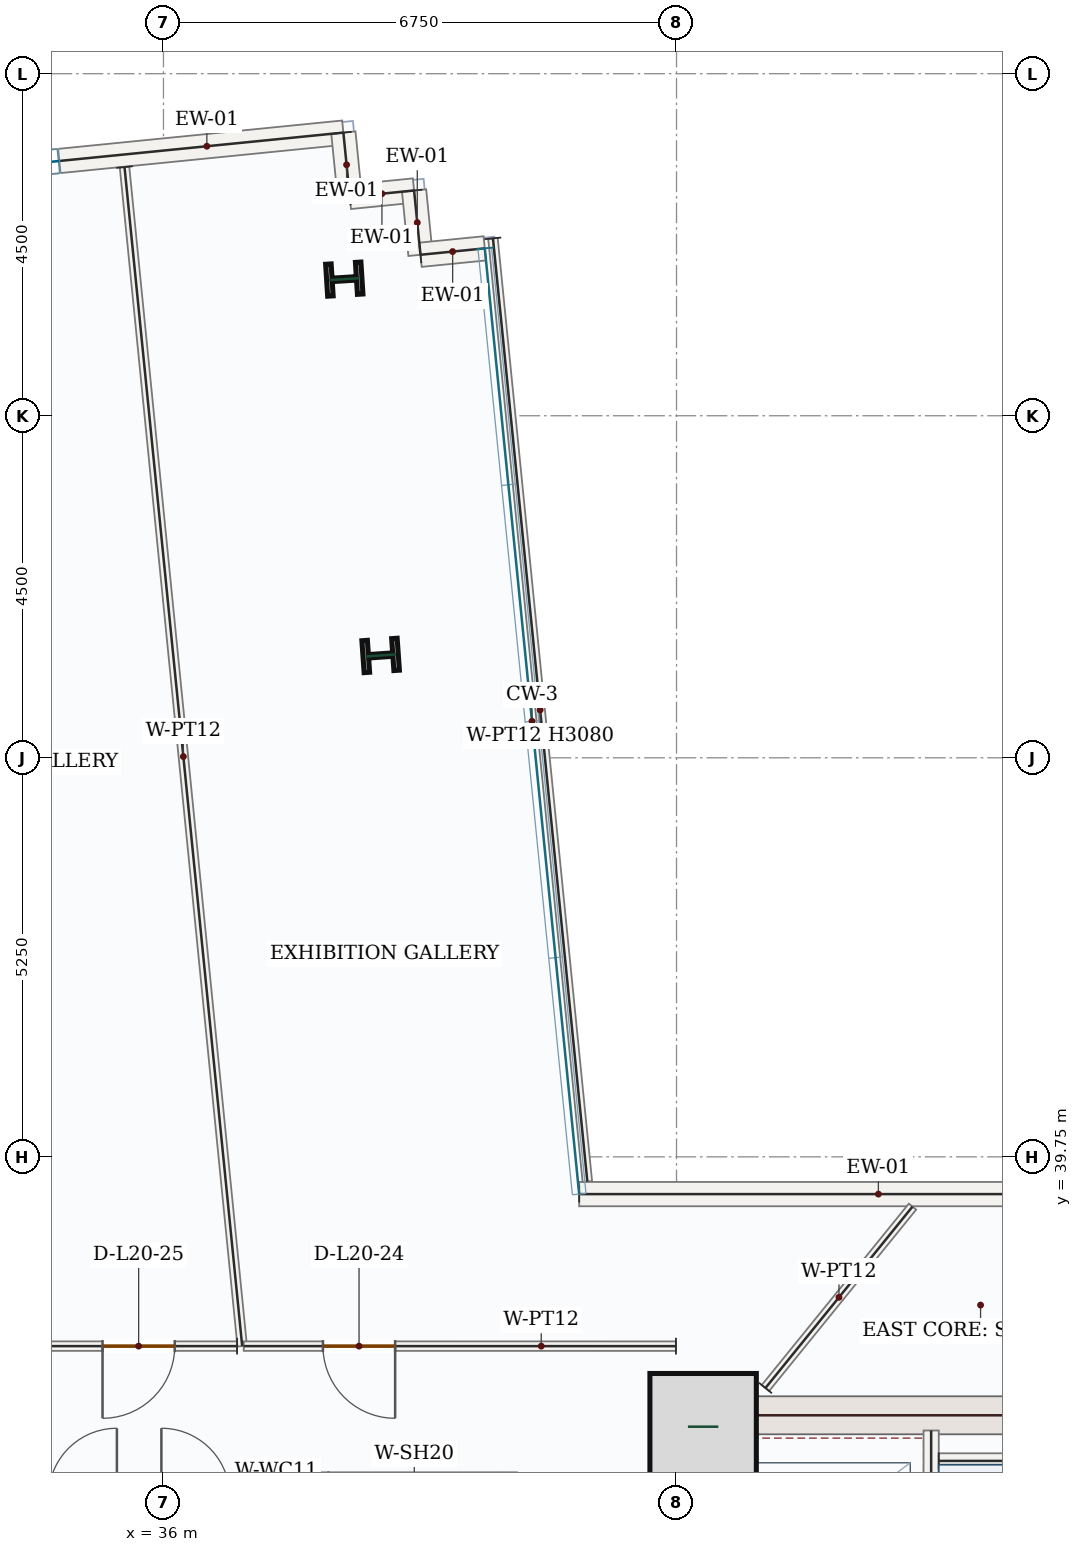
"""IFC4 building model, lengths in metres.
Left out: names, types, materials, properties, quantities, classifications, styles, units other than length and angle.
Written with IfcOpenShell. Run it as: python <this file> out.ifc"""

import sys

from ifc_helpers import new_model, si_unit, direction, frame, frame_2d, origin, origin_2d, place, context, subcontext, project, spatial, rectangle, i_section, extrude, source, transform, mapped, element, fill, save


model = new_model("IFC4")
c1 = context("Model", 3, precision=1e-05, world=origin(), true_north=direction((0.0, 1.0)))
c2 = subcontext(c1, "Body", "Model", "MODEL_VIEW")
j1 = project(units=[si_unit("LENGTHUNIT", "METRE"), si_unit("PLANEANGLEUNIT", "RADIAN")], contexts=[c1])
p1 = place(None, origin())
s1 = spatial("IfcSite", under=j1, at=p1, CompositionType="ELEMENT")
p2 = place(p1, origin())
s2 = spatial("IfcBuilding", under=s1, at=p2, CompositionType="ELEMENT")
p3 = place(p2, frame((0.0, 0.0, 92.1)))
s3 = spatial("IfcBuildingStorey", under=s2, at=p3, CompositionType="ELEMENT", Elevation=92.1)
p4 = place(p3, frame((43.0, 28.05, 0.0), z_axis=(0.0, 0.0, 1.0), x_axis=(0.0, 1.0, 0.0)))
e1 = element("IfcWall", 1, at=p4, inside=s3, PredefinedType="SHEAR", context=c2, shape_type="SweptSolid", body=[
    extrude(rectangle(XDim=8.55, YDim=0.5, at=frame_2d((4.275, 0.0))), origin(), (0.0, 0.0, 1.0), 3.95),
])
p5 = place(p4, frame((1.5, 0.0, 0.0)))
e2 = element("IfcOpeningElement", 2, at=p5, cuts=e1, PredefinedType="OPENING", context=c2, shape_type="SweptSolid", body=[
    extrude(rectangle(XDim=1.1, YDim=2.2, at=frame_2d((0.55, 1.1))), frame((0.0, 0.26, 0.0), z_axis=(0.0, -1.0, 0.0), x_axis=(1.0, 0.0, 0.0)), (0.0, 0.0, 1.0), 0.52),
])
m1 = source(origin(), c2, "Body", "SweptSolid", [
    extrude(rectangle(XDim=7.0, YDim=0.5, at=frame_2d((3.5, 0.0))), origin(), (0.0, 0.0, 1.0), 3.95),
])
p6 = place(p3, frame((43.25, 36.35, 0.0), z_axis=(0.0, 0.0, 1.0), x_axis=(1.0, 0.0, 0.0)))
e3 = element("IfcWall", 3, at=p6, inside=s3, PredefinedType="SHEAR", context=c2, shape_type="MappedRepresentation", body=[
    mapped(m1, transform((0.0, 0.0, 0.0), x_axis=(1.0, 0.0, 0.0), y_axis=(0.0, 1.0, 0.0), z_axis=(0.0, 0.0, 1.0), scale=1.0)),
])
m2 = source(origin(), c2, "Body", "SweptSolid", [
    extrude(rectangle(XDim=1.4, YDim=1.4, at=origin_2d()), origin(), (0.0, 0.0, 1.0), 4.2),
])
p7 = place(p3, frame((43.1, 36.2, 0.0), z_axis=(0.0, 0.0, 1.0), x_axis=(1.0, 0.0, 0.0)))
e4 = element("IfcColumn", 4, at=p7, inside=s3, PredefinedType="COLUMN", context=c2, shape_type="MappedRepresentation", body=[
    mapped(m2, transform((0.0, 0.0, 0.0), x_axis=(1.0, 0.0, 0.0), y_axis=(0.0, 1.0, 0.0), z_axis=(0.0, 0.0, 1.0), scale=1.0)),
])
m3 = source(origin(), c2, "Body", "SweptSolid", [
    extrude(i_section(OverallWidth=0.421, OverallDepth=0.465, WebThickness=0.045, FlangeThickness=0.073, FilletRadius=0.018, at=origin_2d()), origin(), (0.0, 0.0, 1.0), 4.2),
])
for number, where, z_axis, x_axis in (
    (5, (38.857, 46.346, 0.0), (0.0, 0.0, 1.0), (-0.07, 0.998, 0.0)),
    (6, (38.379, 51.297, 0.0), (0.0, 0.0, 1.0), (-0.063, 0.998, 0.0)),
):
    element("IfcColumn", number, at=place(p3, frame(where, z_axis=z_axis, x_axis=x_axis)), inside=s3, PredefinedType="COLUMN", context=c2, shape_type="MappedRepresentation", body=[
        mapped(m3, transform((0.0, 0.0, 0.0), x_axis=(1.0, 0.0, 0.0), y_axis=(0.0, 1.0, 0.0), z_axis=(0.0, 0.0, 1.0), scale=1.0)),
    ])
p8 = place(p3, frame((28.496, 52.24, 0.0), z_axis=(0.0, 0.0, 1.0), x_axis=(0.995054718915, 0.09932827576, 0.0)))
e7 = element("IfcWall", 7, at=p8, inside=s3, PredefinedType="SOLIDWALL", context=c2, shape_type="SweptSolid", body=[
    extrude(rectangle(XDim=9.92, YDim=0.32, at=frame_2d((4.96, 0.0))), origin(), (0.0, 0.0, 1.0), 3.95),
])
p9 = place(p8, frame((3.76, 0.0, 0.85)))
e8 = element("IfcOpeningElement", 8, at=p9, cuts=e7, PredefinedType="OPENING", context=c2, shape_type="SweptSolid", body=[
    extrude(rectangle(XDim=2.4, YDim=1.8, at=frame_2d((1.2, 0.9))), frame((0.0, 0.17, 0.0), z_axis=(0.0, -1.0, 0.0), x_axis=(1.0, 0.0, 0.0)), (0.0, 0.0, 1.0), 0.34),
])
m4 = source(origin(), c2, "Body", "SweptSolid", [
    extrude(rectangle(XDim=0.85, YDim=0.32, at=frame_2d((0.425, 0.0))), origin(), (0.0, 0.0, 1.0), 3.95),
])
for number, where, z_axis, x_axis in (
    (9, (38.367, 53.225, 0.0), (0.0, 0.0, 1.0), (0.099, -0.995, 0.0)),
    (10, (38.451, 52.379, 0.0), (0.0, 0.0, 1.0), (0.995, 0.099, 0.0)),
):
    element("IfcWall", number, at=place(p3, frame(where, z_axis=z_axis, x_axis=x_axis)), inside=s3, PredefinedType="SOLIDWALL", context=c2, shape_type="MappedRepresentation", body=[
        mapped(m4, transform((0.0, 0.0, 0.0), x_axis=(1.0, 0.0, 0.0), y_axis=(0.0, 1.0, 0.0), z_axis=(0.0, 0.0, 1.0), scale=1.0)),
    ])
m5 = source(origin(), c2, "Body", "SweptSolid", [
    extrude(rectangle(XDim=0.85, YDim=0.32, at=frame_2d((0.425, 0.0))), origin(), (0.0, 0.0, 1.0), 3.95),
])
p10 = place(p3, frame((39.297, 52.463, 0.0), z_axis=(0.0, 0.0, 1.0), x_axis=(0.099105525559, -0.995076929088, 0.0)))
e11 = element("IfcWall", 11, at=p10, inside=s3, PredefinedType="SOLIDWALL", context=c2, shape_type="MappedRepresentation", body=[
    mapped(m5, transform((0.0, 0.0, 0.0), x_axis=(1.0, 0.0, 0.0), y_axis=(0.0, 1.0, 0.0), z_axis=(0.0, 0.0, 1.0), scale=1.0)),
])
p11 = place(p3, frame((39.382, 51.618, 0.0), z_axis=(0.0, 0.0, 1.0), x_axis=(0.995079749343, 0.09907720448, 0.0)))
e12 = element("IfcWall", 12, at=p11, inside=s3, PredefinedType="SOLIDWALL", context=c2, shape_type="MappedRepresentation", body=[
    mapped(m4, transform((0.0, 0.0, 0.0), x_axis=(1.0, 0.0, 0.0), y_axis=(0.0, 1.0, 0.0), z_axis=(0.0, 0.0, 1.0), scale=1.0)),
])
m6 = source(origin(), c2, "Body", "SweptSolid", [
    extrude(rectangle(XDim=7.873, YDim=0.32, at=frame_2d((3.936, 0.0))), origin(), (0.0, 0.0, 1.0), 3.95),
])
p12 = place(p3, frame((41.469, 39.26, 0.0), z_axis=(0.0, 0.0, 1.0), x_axis=(1.0, 0.0, 0.0)))
e13 = element("IfcWall", 13, at=p12, inside=s3, PredefinedType="SOLIDWALL", context=c2, shape_type="MappedRepresentation", body=[
    mapped(m6, transform((0.0, 0.0, 0.0), x_axis=(1.0, 0.0, 0.0), y_axis=(0.0, 1.0, 0.0), z_axis=(0.0, 0.0, 1.0), scale=1.0)),
])
p13 = place(p3, frame((46.1, 28.15, 0.0), z_axis=(0.0, 0.0, 1.0), x_axis=(0.0, 1.0, 0.0)))
e14 = element("IfcWall", 14, at=p13, inside=s3, PredefinedType="SOLIDWALL", context=c2, shape_type="SweptSolid", body=[
    extrude(rectangle(XDim=8.0, YDim=0.2, at=frame_2d((4.0, 0.0))), origin(), (0.0, 0.0, 1.0), 3.95),
])
p14 = place(p13, frame((0.4, 0.0, 0.0)))
e15 = element("IfcOpeningElement", 15, at=p14, cuts=e14, PredefinedType="OPENING", context=c2, shape_type="SweptSolid", body=[
    extrude(rectangle(XDim=1.05, YDim=2.15, at=frame_2d((0.525, 1.075))), frame((0.0, 0.11, 0.0), z_axis=(0.0, -1.0, 0.0), x_axis=(1.0, 0.0, 0.0)), (0.0, 0.0, 1.0), 0.22),
])
m7 = source(origin(), c2, "Body", "SweptSolid", [
    extrude(rectangle(XDim=3.25, YDim=0.2, at=frame_2d((1.625, 0.0))), origin(), (0.0, 0.0, 1.0), 3.95),
])
p15 = place(p3, frame((46.2, 35.75, 0.0), z_axis=(0.0, 0.0, 1.0), x_axis=(1.0, 0.0, 0.0)))
e16 = element("IfcWall", 16, at=p15, inside=s3, PredefinedType="SOLIDWALL", context=c2, shape_type="MappedRepresentation", body=[
    mapped(m7, transform((0.0, 0.0, 0.0), x_axis=(1.0, 0.0, 0.0), y_axis=(0.0, 1.0, 0.0), z_axis=(0.0, 0.0, 1.0), scale=1.0)),
])
m8 = source(origin(), c2, "Body", "SweptSolid", [
    extrude(rectangle(XDim=2.4, YDim=0.2, at=frame_2d((1.2, 0.0))), origin(), (0.0, 0.0, 1.0), 3.95),
])
for number, where, z_axis, x_axis in (
    (17, (38.05, 33.2, 0.0), (0.0, 0.0, 1.0), (0.0, 1.0, 0.0)),
    (18, (40.55, 33.2, 0.0), (0.0, 0.0, 1.0), (0.0, 1.0, 0.0)),
):
    element("IfcWall", number, at=place(p3, frame(where, z_axis=z_axis, x_axis=x_axis)), inside=s3, PredefinedType="SOLIDWALL", context=c2, shape_type="MappedRepresentation", body=[
        mapped(m8, transform((0.0, 0.0, 0.0), x_axis=(1.0, 0.0, 0.0), y_axis=(0.0, 1.0, 0.0), z_axis=(0.0, 0.0, 1.0), scale=1.0)),
    ])
m9 = source(origin(), c2, "Body", "SweptSolid", [
    extrude(rectangle(XDim=3.072, YDim=0.125, at=frame_2d((1.536, 0.0))), origin(), (0.0, 0.0, 1.0), 3.95),
])
p16 = place(p3, frame((43.92, 36.709, 0.0), z_axis=(0.0, 0.0, 1.0), x_axis=(0.629760486176, 0.776789373029, 0.0)))
e19 = element("IfcWall", 19, at=p16, inside=s3, PredefinedType="PARTITIONING", context=c2, shape_type="MappedRepresentation", body=[
    mapped(m9, transform((0.0, 0.0, 0.0), x_axis=(1.0, 0.0, 0.0), y_axis=(0.0, 1.0, 0.0), z_axis=(0.0, 0.0, 1.0), scale=1.0)),
])
m10 = source(origin(), c2, "Body", "SweptSolid", [
    extrude(rectangle(XDim=15.589, YDim=0.125, at=frame_2d((7.794, 0.0))), origin(), (0.0, 0.0, 1.0), 3.95),
])
p17 = place(p3, frame((35.488, 52.771, 0.0), z_axis=(0.0, 0.0, 1.0), x_axis=(0.099325393126, -0.995055006661, 0.0)))
e20 = element("IfcWall", 20, at=p17, inside=s3, PredefinedType="PARTITIONING", context=c2, shape_type="MappedRepresentation", body=[
    mapped(m10, transform((0.0, 0.0, 0.0), x_axis=(1.0, 0.0, 0.0), y_axis=(0.0, 1.0, 0.0), z_axis=(0.0, 0.0, 1.0), scale=1.0)),
])
p18 = place(p3, frame((36.968, 37.26, 0.0), z_axis=(0.0, 0.0, 1.0), x_axis=(-1.0, 0.0, 0.0)))
e21 = element("IfcWall", 21, at=p18, inside=s3, PredefinedType="PARTITIONING", context=c2, shape_type="SweptSolid", body=[
    extrude(rectangle(XDim=4.676, YDim=0.125, at=frame_2d((2.338, 0.0))), origin(), (0.0, 0.0, 1.0), 3.95),
])
p19 = place(p18, frame((0.82, 0.0, 0.0)))
e22 = element("IfcOpeningElement", 22, at=p19, cuts=e21, PredefinedType="OPENING", context=c2, shape_type="SweptSolid", body=[
    extrude(rectangle(XDim=0.95, YDim=2.15, at=frame_2d((0.475, 1.075))), frame((0.0, 0.073, 0.0), z_axis=(0.0, -1.0, 0.0), x_axis=(1.0, 0.0, 0.0)), (0.0, 0.0, 1.0), 0.145),
])
p20 = place(p3, frame((42.742, 37.26, 0.0), z_axis=(0.0, 0.0, 1.0), x_axis=(-0.999999999078, 4.2935039e-05, 0.0)))
e23 = element("IfcWall", 23, at=p20, inside=s3, PredefinedType="PARTITIONING", context=c2, shape_type="SweptSolid", body=[
    extrude(rectangle(XDim=5.686, YDim=0.125, at=frame_2d((2.843, 0.0))), origin(), (0.0, 0.0, 1.0), 3.95),
])
p21 = place(p20, frame((3.694, 0.0, 0.0)))
e24 = element("IfcOpeningElement", 24, at=p21, cuts=e23, PredefinedType="OPENING", context=c2, shape_type="SweptSolid", body=[
    extrude(rectangle(XDim=0.95, YDim=2.15, at=frame_2d((0.475, 1.075))), frame((0.0, 0.073, 0.0), z_axis=(0.0, -1.0, 0.0), x_axis=(1.0, 0.0, 0.0)), (0.0, 0.0, 1.0), 0.145),
])
m11 = source(origin(), c2, "Body", "SweptSolid", [
    extrude(rectangle(XDim=12.47, YDim=0.125, at=frame_2d((6.235, 0.0))), origin(), (0.0, 0.0, 1.0), 3.08),
])
p22 = place(p3, frame((40.335, 51.833, 0.0), z_axis=(0.0, 0.0, 1.0), x_axis=(0.099590945301, -0.99502846372, 0.0)))
e25 = element("IfcWall", 25, at=p22, inside=s3, PredefinedType="PARTITIONING", context=c2, shape_type="MappedRepresentation", body=[
    mapped(m11, transform((0.0, 0.0, 0.0), x_axis=(1.0, 0.0, 0.0), y_axis=(0.0, 1.0, 0.0), z_axis=(0.0, 0.0, 1.0), scale=1.0)),
])
m12 = source(origin(), c2, "Body", "SweptSolid", [
    extrude(rectangle(XDim=2.4, YDim=1.8, at=frame_2d((1.2, 0.9))), frame((0.0, 0.03, 0.0), z_axis=(0.0, -1.0, 0.0), x_axis=(1.0, 0.0, 0.0)), (0.0, 0.0, 1.0), 0.06),
])
p23 = place(p9, origin())
e26 = element("IfcWindow", 26, at=p23, inside=s3, PartitioningType="DOUBLE_PANEL_VERTICAL", PredefinedType="WINDOW", context=c2, shape_type="MappedRepresentation", body=[
    mapped(m12, transform((0.0, 0.0, 0.0), x_axis=(1.0, 0.0, 0.0), y_axis=(0.0, 1.0, 0.0), z_axis=(0.0, 0.0, 1.0), scale=1.0)),
])
fill(e8, e26)
m13 = source(origin(), c2, "Body", "SweptSolid", [
    extrude(rectangle(XDim=0.95, YDim=2.15, at=frame_2d((0.475, 1.075))), frame((0.0, 0.025, 0.0), z_axis=(0.0, -1.0, 0.0), x_axis=(1.0, 0.0, 0.0)), (0.0, 0.0, 1.0), 0.05),
])
p24 = place(p21, origin())
e27 = element("IfcDoor", 27, at=p24, inside=s3, OperationType="SINGLE_SWING_LEFT", PredefinedType="DOOR", context=c2, shape_type="MappedRepresentation", body=[
    mapped(m13, transform((0.0, 0.0, 0.0), x_axis=(1.0, 0.0, 0.0), y_axis=(0.0, 1.0, 0.0), z_axis=(0.0, 0.0, 1.0), scale=1.0)),
])
fill(e24, e27)
p25 = place(p19, origin())
e28 = element("IfcDoor", 28, at=p25, inside=s3, OperationType="SINGLE_SWING_RIGHT", PredefinedType="DOOR", context=c2, shape_type="MappedRepresentation", body=[
    mapped(m13, transform((0.0, 0.0, 0.0), x_axis=(1.0, 0.0, 0.0), y_axis=(0.0, 1.0, 0.0), z_axis=(0.0, 0.0, 1.0), scale=1.0)),
])
fill(e22, e28)
save(model, sys.argv[1])
